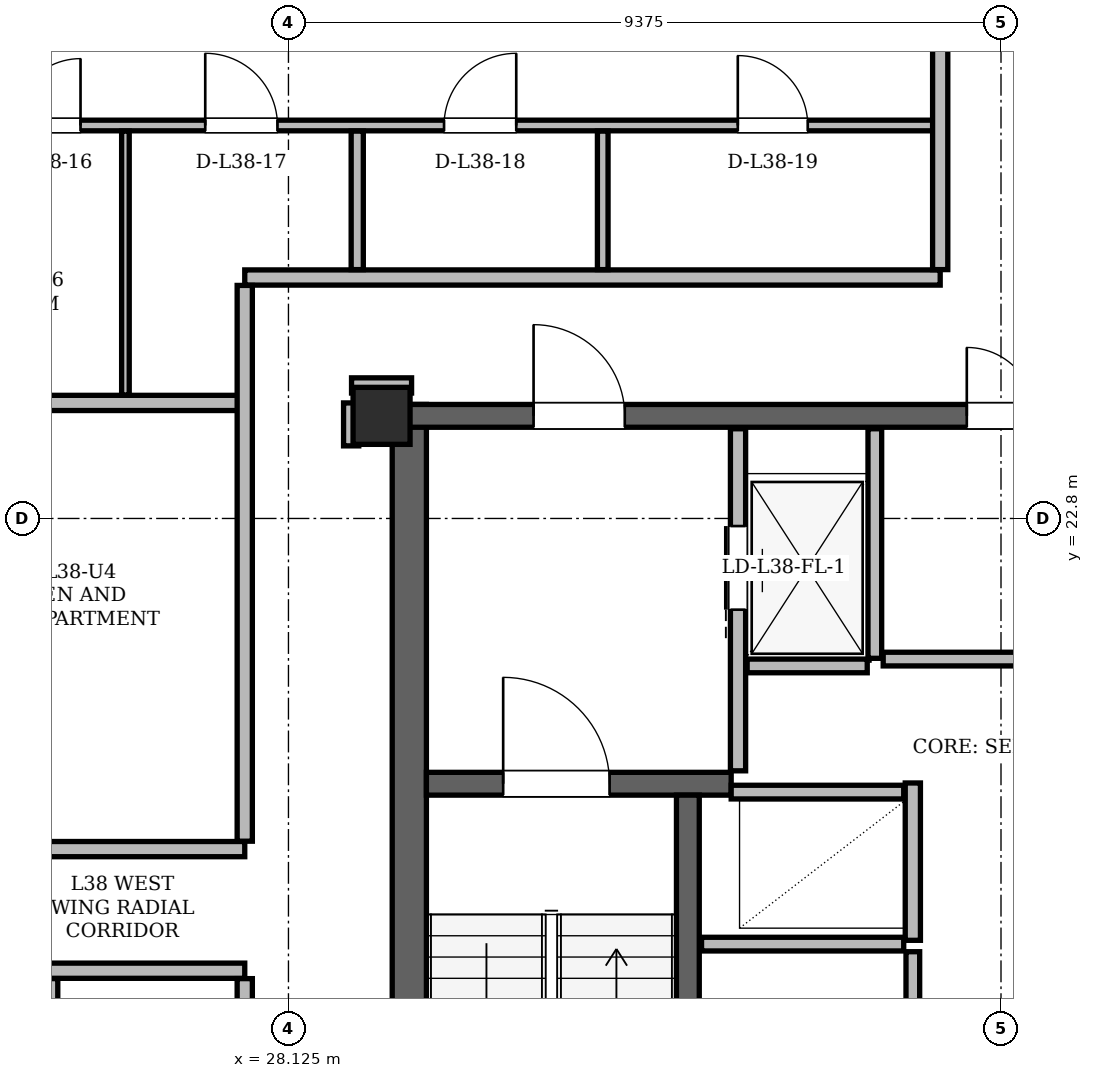
"""IFC4 building model, lengths in metres.
Left out: names, types, materials, properties, quantities, classifications, styles, units other than length and angle.
Written with IfcOpenShell. Run it as: python <this file> out.ifc"""

import sys

from ifc_helpers import new_model, si_unit, direction, frame, frame_2d, origin, origin_2d, place, context, subcontext, project, spatial, rectangle, hollow_rectangle, extrude, element, fill, save


model = new_model("IFC4")
c1 = context("Model", 3, precision=1e-05, world=origin(), true_north=direction((0.0, 1.0)))
c2 = subcontext(c1, "Body", "Model", "MODEL_VIEW")
j1 = project(units=[si_unit("LENGTHUNIT", "METRE"), si_unit("PLANEANGLEUNIT", "RADIAN")], contexts=[c1])
p1 = place(None, origin())
s1 = spatial("IfcSite", under=j1, at=p1, CompositionType="ELEMENT")
p2 = place(p1, origin())
s2 = spatial("IfcBuilding", under=s1, at=p2, CompositionType="ELEMENT")
p3 = place(p2, frame((0.0, 0.0, 145.8)))
s3 = spatial("IfcBuildingStorey", under=s2, at=p3, CompositionType="ELEMENT", Elevation=145.8)
p4 = place(p3, frame((29.35, 24.15, 0.0), z_axis=(0.0, 0.0, 1.0), x_axis=(1.0, 0.0, 0.0)))
e1 = element("IfcColumn", 1, at=p4, inside=s3, PredefinedType="COLUMN", context=c2, shape_type="SweptSolid", body=[
    extrude(hollow_rectangle(XDim=0.75, YDim=0.75, WallThickness=0.06, at=origin_2d()), origin(), (0.0, 0.0, 1.0), 3.6),
])
p5 = place(p3, frame((29.715, 11.0, 0.0), z_axis=(0.0, 0.0, 1.0), x_axis=(0.0, 1.0, 0.0)))
e2 = element("IfcWall", 2, at=p5, inside=s3, PredefinedType="SHEAR", context=c2, shape_type="SweptSolid", body=[
    extrude(rectangle(XDim=13.3, YDim=0.45, at=frame_2d((6.65, 0.0))), origin(), (0.0, 0.0, 1.0), 3.38),
])
p6 = place(p3, frame((29.65, 24.15, 0.0), z_axis=(0.0, 0.0, 1.0), x_axis=(1.0, 0.0, 0.0)))
e3 = element("IfcWall", 3, at=p6, inside=s3, PredefinedType="SHEAR", context=c2, shape_type="SweptSolid", body=[
    extrude(rectangle(XDim=15.7, YDim=0.3, at=frame_2d((7.85, 0.0))), origin(), (0.0, 0.0, 1.0), 3.38),
])
p7 = place(p6, frame((1.7, 0.0, 0.0)))
e4 = element("IfcOpeningElement", 4, at=p7, cuts=e3, PredefinedType="OPENING", context=c2, shape_type="SweptSolid", body=[
    extrude(rectangle(XDim=1.2, YDim=2.2, at=frame_2d((0.6, 1.1))), frame((0.0, 0.15, 0.0), z_axis=(0.0, -1.0, 0.0), x_axis=(1.0, 0.0, 0.0)), (0.0, 0.0, 1.0), 0.3),
])
p8 = place(p6, frame((12.8, 0.0, 0.0)))
e5 = element("IfcOpeningElement", 5, at=p8, cuts=e3, PredefinedType="OPENING", context=c2, shape_type="SweptSolid", body=[
    extrude(rectangle(XDim=1.2, YDim=2.2, at=frame_2d((0.6, 1.1))), frame((0.0, 0.15, 0.0), z_axis=(0.0, -1.0, 0.0), x_axis=(1.0, 0.0, 0.0)), (0.0, 0.0, 1.0), 0.3),
])
p9 = place(p6, frame((7.4, 0.0, 0.0)))
e6 = element("IfcOpeningElement", 6, at=p9, cuts=e3, PredefinedType="OPENING", context=c2, shape_type="SweptSolid", body=[
    extrude(rectangle(XDim=0.9, YDim=2.05, at=frame_2d((0.45, 1.025))), frame((0.0, 0.15, 0.0), z_axis=(0.0, -1.0, 0.0), x_axis=(1.0, 0.0, 0.0)), (0.0, 0.0, 1.0), 0.3),
])
p10 = place(p3, frame((29.94, 19.31, 0.0), z_axis=(0.0, 0.0, 1.0), x_axis=(1.0, 0.0, 0.0)))
e7 = element("IfcWall", 7, at=p10, inside=s3, PredefinedType="SHEAR", context=c2, shape_type="SweptSolid", body=[
    extrude(rectangle(XDim=4.01, YDim=0.3, at=frame_2d((2.005, 0.0))), origin(), (0.0, 0.0, 1.0), 3.38),
])
p11 = place(p10, frame((1.01, 0.0, 0.0)))
e8 = element("IfcOpeningElement", 8, at=p11, cuts=e7, PredefinedType="OPENING", context=c2, shape_type="SweptSolid", body=[
    extrude(rectangle(XDim=1.4, YDim=2.2, at=frame_2d((0.7, 1.1))), frame((0.0, 0.15, 0.0), z_axis=(0.0, -1.0, 0.0), x_axis=(1.0, 0.0, 0.0)), (0.0, 0.0, 1.0), 0.3),
])
p12 = place(p3, frame((33.38, 11.54, 0.0), z_axis=(0.0, 0.0, 1.0), x_axis=(0.0, 1.0, 0.0)))
e9 = element("IfcWall", 9, at=p12, inside=s3, PredefinedType="SHEAR", context=c2, shape_type="SweptSolid", body=[
    extrude(rectangle(XDim=7.62, YDim=0.3, at=frame_2d((3.81, 0.0))), origin(), (0.0, 0.0, 1.0), 3.38),
])
p13 = place(p3, frame((32.649, 43.341, 0.0), z_axis=(0.0, 0.0, 1.0), x_axis=(-0.500002412417, -0.86602401097, 0.0)))
e10 = element("IfcWall", 10, at=p13, inside=s3, PredefinedType="SOLIDWALL", context=c2, shape_type="SweptSolid", body=[
    extrude(rectangle(XDim=35.404, YDim=0.34, at=frame_2d((17.702, 0.0))), origin(), (0.0, 0.0, 1.0), 2.6),
])
p14 = place(p13, frame((6.579, 0.0, 0.0)))
e11 = element("IfcOpeningElement", 11, at=p14, cuts=e10, PredefinedType="OPENING", context=c2, shape_type="SweptSolid", body=[
    extrude(rectangle(XDim=1.5, YDim=2.2, at=frame_2d((0.75, 1.1))), frame((0.0, 0.17, 0.0), z_axis=(0.0, -1.0, 0.0), x_axis=(1.0, 0.0, 0.0)), (0.0, 0.0, 1.0), 0.34),
])
p15 = place(p13, frame((26.289, 0.0, 0.0)))
e12 = element("IfcOpeningElement", 12, at=p15, cuts=e10, PredefinedType="OPENING", context=c2, shape_type="SweptSolid", body=[
    extrude(rectangle(XDim=1.5, YDim=2.2, at=frame_2d((0.75, 1.1))), frame((0.0, 0.17, 0.0), z_axis=(0.0, -1.0, 0.0), x_axis=(1.0, 0.0, 0.0)), (0.0, 0.0, 1.0), 0.34),
])
p16 = place(p13, frame((22.194, 0.0, 0.85)))
e13 = element("IfcOpeningElement", 13, at=p16, cuts=e10, PredefinedType="OPENING", context=c2, shape_type="SweptSolid", body=[
    extrude(rectangle(XDim=1.2, YDim=1.48, at=frame_2d((0.6, 0.74))), frame((0.0, 0.17, 0.0), z_axis=(0.0, -1.0, 0.0), x_axis=(1.0, 0.0, 0.0)), (0.0, 0.0, 1.0), 0.34),
])
p17 = place(p13, frame((2.317, 0.0, 0.85)))
e14 = element("IfcOpeningElement", 14, at=p17, cuts=e10, PredefinedType="OPENING", context=c2, shape_type="SweptSolid", body=[
    extrude(rectangle(XDim=1.6, YDim=1.64, at=frame_2d((0.8, 0.82))), frame((0.0, 0.17, 0.0), z_axis=(0.0, -1.0, 0.0), x_axis=(1.0, 0.0, 0.0)), (0.0, 0.0, 1.0), 0.34),
])
p18 = place(p13, frame((12.951, 0.0, 0.85)))
e15 = element("IfcOpeningElement", 15, at=p18, cuts=e10, PredefinedType="OPENING", context=c2, shape_type="SweptSolid", body=[
    extrude(rectangle(XDim=3.0, YDim=1.64, at=frame_2d((1.5, 0.82))), frame((0.0, 0.17, 0.0), z_axis=(0.0, -1.0, 0.0), x_axis=(1.0, 0.0, 0.0)), (0.0, 0.0, 1.0), 0.34),
])
p19 = place(p13, frame((20.282, 0.0, 0.85)))
e16 = element("IfcOpeningElement", 16, at=p19, cuts=e10, PredefinedType="OPENING", context=c2, shape_type="SweptSolid", body=[
    extrude(rectangle(XDim=1.2, YDim=1.48, at=frame_2d((0.6, 0.74))), frame((0.0, 0.17, 0.0), z_axis=(0.0, -1.0, 0.0), x_axis=(1.0, 0.0, 0.0)), (0.0, 0.0, 1.0), 0.34),
])
p20 = place(p13, frame((33.524, 0.0, 0.85)))
e17 = element("IfcOpeningElement", 17, at=p20, cuts=e10, PredefinedType="OPENING", context=c2, shape_type="SweptSolid", body=[
    extrude(rectangle(XDim=1.2, YDim=1.48, at=frame_2d((0.6, 0.74))), frame((0.0, 0.17, 0.0), z_axis=(0.0, -1.0, 0.0), x_axis=(1.0, 0.0, 0.0)), (0.0, 0.0, 1.0), 0.34),
])
p21 = place(p3, frame((34.04, 19.48, 0.0), z_axis=(0.0, 0.0, 1.0), x_axis=(0.0, 1.0, 0.0)))
e18 = element("IfcWall", 18, at=p21, inside=s3, PredefinedType="PARTITIONING", context=c2, shape_type="SweptSolid", body=[
    extrude(rectangle(XDim=4.5, YDim=0.2, at=frame_2d((2.25, 0.0))), origin(), (0.0, 0.0, 1.0), 2.42),
])
p22 = place(p21, frame((2.12, 0.0, 0.0)))
e19 = element("IfcOpeningElement", 19, at=p22, cuts=e18, PredefinedType="OPENING", context=c2, shape_type="SweptSolid", body=[
    extrude(rectangle(XDim=1.1, YDim=2.2, at=frame_2d((0.55, 1.1))), frame((0.0, 0.1, 0.0), z_axis=(0.0, -1.0, 0.0), x_axis=(1.0, 0.0, 0.0)), (0.0, 0.0, 1.0), 0.2),
])
p23 = place(p3, frame((35.84, 20.96, 0.0), z_axis=(0.0, 0.0, 1.0), x_axis=(0.0, 1.0, 0.0)))
e20 = element("IfcWall", 20, at=p23, inside=s3, PredefinedType="PARTITIONING", context=c2, shape_type="SweptSolid", body=[
    extrude(rectangle(XDim=3.02, YDim=0.18, at=frame_2d((1.51, 0.0))), origin(), (0.0, 0.0, 1.0), 2.42),
])
p24 = place(p3, frame((34.16, 20.86, 0.0), z_axis=(0.0, 0.0, 1.0), x_axis=(1.0, 0.0, 0.0)))
e21 = element("IfcWall", 21, at=p24, inside=s3, PredefinedType="PARTITIONING", context=c2, shape_type="SweptSolid", body=[
    extrude(rectangle(XDim=1.58, YDim=0.18, at=frame_2d((0.79, 0.0))), origin(), (0.0, 0.0, 1.0), 3.38),
])
p25 = place(p3, frame((36.34, 17.25, 0.0), z_axis=(0.0, 0.0, 1.0), x_axis=(0.0, 1.0, 0.0)))
e22 = element("IfcWall", 22, at=p25, inside=s3, PredefinedType="PARTITIONING", context=c2, shape_type="SweptSolid", body=[
    extrude(rectangle(XDim=2.07, YDim=0.2, at=frame_2d((1.035, 0.0))), origin(), (0.0, 0.0, 1.0), 3.38),
])
p26 = place(p3, frame((33.95, 19.2, 0.0), z_axis=(0.0, 0.0, 1.0), x_axis=(1.0, 0.0, 0.0)))
e23 = element("IfcWall", 23, at=p26, inside=s3, PredefinedType="PARTITIONING", context=c2, shape_type="SweptSolid", body=[
    extrude(rectangle(XDim=2.27, YDim=0.18, at=frame_2d((1.135, 0.0))), origin(), (0.0, 0.0, 1.0), 3.38),
])
p27 = place(p3, frame((33.56, 17.2, 0.0), z_axis=(0.0, 0.0, 1.0), x_axis=(1.0, 0.0, 0.0)))
e24 = element("IfcWall", 24, at=p27, inside=s3, PredefinedType="PARTITIONING", context=c2, shape_type="SweptSolid", body=[
    extrude(rectangle(XDim=2.66, YDim=0.18, at=frame_2d((1.33, 0.0))), origin(), (0.0, 0.0, 1.0), 3.38),
])
p28 = place(p3, frame((36.34, 11.55, 0.0), z_axis=(0.0, 0.0, 1.0), x_axis=(0.0, 1.0, 0.0)))
e25 = element("IfcWall", 25, at=p28, inside=s3, PredefinedType="PARTITIONING", context=c2, shape_type="SweptSolid", body=[
    extrude(rectangle(XDim=5.55, YDim=0.18, at=frame_2d((2.775, 0.0))), origin(), (0.0, 0.0, 1.0), 3.38),
])
p29 = place(p28, frame((0.55, 0.0, 0.0)))
e26 = element("IfcOpeningElement", 26, at=p29, cuts=e25, PredefinedType="OPENING", context=c2, shape_type="SweptSolid", body=[
    extrude(rectangle(XDim=0.88, YDim=2.08, at=frame_2d((0.44, 1.04))), frame((0.0, 0.09, 0.0), z_axis=(0.0, -1.0, 0.0), x_axis=(1.0, 0.0, 0.0)), (0.0, 0.0, 1.0), 0.18),
])
p30 = place(p28, frame((3.25, 0.0, 0.0)))
e27 = element("IfcOpeningElement", 27, at=p30, cuts=e25, PredefinedType="OPENING", context=c2, shape_type="SweptSolid", body=[
    extrude(rectangle(XDim=0.88, YDim=2.08, at=frame_2d((0.44, 1.04))), frame((0.0, 0.09, 0.0), z_axis=(0.0, -1.0, 0.0), x_axis=(1.0, 0.0, 0.0)), (0.0, 0.0, 1.0), 0.18),
])
p31 = place(p3, frame((35.95, 20.95, 0.0), z_axis=(0.0, 0.0, 1.0), x_axis=(1.0, 0.0, 0.0)))
e28 = element("IfcWall", 28, at=p31, inside=s3, PredefinedType="PARTITIONING", context=c2, shape_type="SweptSolid", body=[
    extrude(rectangle(XDim=3.1, YDim=0.18, at=frame_2d((1.55, 0.0))), origin(), (0.0, 0.0, 1.0), 3.38),
])
p32 = place(p3, frame((17.556, 16.85, 0.0), z_axis=(0.0, 0.0, 1.0), x_axis=(1.0, 0.0, 0.0)))
e29 = element("IfcWall", 29, at=p32, inside=s3, PredefinedType="PARTITIONING", context=c2, shape_type="SweptSolid", body=[
    extrude(rectangle(XDim=9.994, YDim=0.2, at=frame_2d((4.997, 0.0))), origin(), (0.0, 0.0, 1.0), 3.38),
])
p33 = place(p3, frame((18.479, 18.45, 0.0), z_axis=(0.0, 0.0, 1.0), x_axis=(1.0, 0.0, 0.0)))
e30 = element("IfcWall", 30, at=p33, inside=s3, PredefinedType="PARTITIONING", context=c2, shape_type="SweptSolid", body=[
    extrude(rectangle(XDim=9.071, YDim=0.2, at=frame_2d((4.535, 0.0))), origin(), (0.0, 0.0, 1.0), 3.38),
])
p34 = place(p33, frame((4.941, 0.0, 0.0)))
e31 = element("IfcOpeningElement", 31, at=p34, cuts=e30, PredefinedType="OPENING", context=c2, shape_type="SweptSolid", body=[
    extrude(rectangle(XDim=1.0, YDim=2.18, at=frame_2d((0.5, 1.09))), frame((0.0, 0.1, 0.0), z_axis=(0.0, -1.0, 0.0), x_axis=(1.0, 0.0, 0.0)), (0.0, 0.0, 1.0), 0.2),
])
p35 = place(p3, frame((21.869, 24.32, 0.0), z_axis=(0.0, 0.0, 1.0), x_axis=(1.0, 0.0, 0.0)))
e32 = element("IfcWall", 32, at=p35, inside=s3, PredefinedType="PARTITIONING", context=c2, shape_type="SweptSolid", body=[
    extrude(rectangle(XDim=5.681, YDim=0.2, at=frame_2d((2.841, 0.0))), origin(), (0.0, 0.0, 1.0), 3.38),
])
p36 = place(p3, frame((28.955, 24.55, 0.0), z_axis=(0.0, 0.0, 1.0), x_axis=(1.0, 0.0, 0.0)))
e33 = element("IfcWall", 33, at=p36, inside=s3, PredefinedType="PARTITIONING", context=c2, shape_type="SweptSolid", body=[
    extrude(rectangle(XDim=0.79, YDim=0.2, at=frame_2d((0.395, 0.0))), origin(), (0.0, 0.0, 1.0), 2.842),
])
p37 = place(p3, frame((27.55, 25.97, 0.0), z_axis=(0.0, 0.0, 1.0), x_axis=(1.0, 0.0, 0.0)))
e34 = element("IfcWall", 34, at=p37, inside=s3, PredefinedType="PARTITIONING", context=c2, shape_type="SweptSolid", body=[
    extrude(rectangle(XDim=9.15, YDim=0.2, at=frame_2d((4.575, 0.0))), origin(), (0.0, 0.0, 1.0), 2.842),
])
p38 = place(p3, frame((23.976, 27.97, 0.0), z_axis=(0.0, 0.0, 1.0), x_axis=(1.0, 0.0, 0.0)))
e35 = element("IfcWall", 35, at=p38, inside=s3, PredefinedType="PARTITIONING", context=c2, shape_type="SweptSolid", body=[
    extrude(rectangle(XDim=12.774, YDim=0.14, at=frame_2d((6.387, 0.0))), origin(), (0.0, 0.0, 1.0), 2.842),
])
p39 = place(p38, frame((0.533, 0.0, 0.0)))
e36 = element("IfcOpeningElement", 36, at=p39, cuts=e35, PredefinedType="OPENING", context=c2, shape_type="SweptSolid", body=[
    extrude(rectangle(XDim=0.88, YDim=2.08, at=frame_2d((0.44, 1.04))), frame((0.0, 0.07, 0.0), z_axis=(0.0, -1.0, 0.0), x_axis=(1.0, 0.0, 0.0)), (0.0, 0.0, 1.0), 0.14),
])
p40 = place(p38, frame((3.054, 0.0, 0.0)))
e37 = element("IfcOpeningElement", 37, at=p40, cuts=e35, PredefinedType="OPENING", context=c2, shape_type="SweptSolid", body=[
    extrude(rectangle(XDim=0.95, YDim=2.1, at=frame_2d((0.475, 1.05))), frame((0.0, 0.07, 0.0), z_axis=(0.0, -1.0, 0.0), x_axis=(1.0, 0.0, 0.0)), (0.0, 0.0, 1.0), 0.14),
])
p41 = place(p38, frame((6.196, 0.0, 0.0)))
e38 = element("IfcOpeningElement", 38, at=p41, cuts=e35, PredefinedType="OPENING", context=c2, shape_type="SweptSolid", body=[
    extrude(rectangle(XDim=0.95, YDim=2.1, at=frame_2d((0.475, 1.05))), frame((0.0, 0.07, 0.0), z_axis=(0.0, -1.0, 0.0), x_axis=(1.0, 0.0, 0.0)), (0.0, 0.0, 1.0), 0.14),
])
p42 = place(p38, frame((10.061, 0.0, 0.0)))
e39 = element("IfcOpeningElement", 39, at=p42, cuts=e35, PredefinedType="OPENING", context=c2, shape_type="SweptSolid", body=[
    extrude(rectangle(XDim=0.92, YDim=2.12, at=frame_2d((0.46, 1.06))), frame((0.0, 0.07, 0.0), z_axis=(0.0, -1.0, 0.0), x_axis=(1.0, 0.0, 0.0)), (0.0, 0.0, 1.0), 0.14),
])
p43 = place(p3, frame((25.03, 14.334, 0.0), z_axis=(0.0, 0.0, 1.0), x_axis=(0.0, 1.0, 0.0)))
e40 = element("IfcWall", 40, at=p43, inside=s3, PredefinedType="PARTITIONING", context=c2, shape_type="SweptSolid", body=[
    extrude(rectangle(XDim=2.412, YDim=0.12, at=frame_2d((1.206, 0.0))), origin(), (0.0, 0.0, 1.0), 3.38),
])
p44 = place(p3, frame((25.98, 24.424, 0.0), z_axis=(0.0, 0.0, 1.0), x_axis=(0.0, 1.0, 0.0)))
e41 = element("IfcWall", 41, at=p44, inside=s3, PredefinedType="PARTITIONING", context=c2, shape_type="SweptSolid", body=[
    extrude(rectangle(XDim=3.472, YDim=0.1, at=frame_2d((1.736, 0.0))), origin(), (0.0, 0.0, 1.0), 3.38),
])
p45 = place(p3, frame((27.55, 11.054, 0.0), z_axis=(0.0, 0.0, 1.0), x_axis=(0.0, 1.0, 0.0)))
e42 = element("IfcWall", 42, at=p45, inside=s3, PredefinedType="PARTITIONING", context=c2, shape_type="SweptSolid", body=[
    extrude(rectangle(XDim=5.692, YDim=0.2, at=frame_2d((2.846, 0.0))), origin(), (0.0, 0.0, 1.0), 2.842),
])
p46 = place(p3, frame((27.55, 18.554, 0.0), z_axis=(0.0, 0.0, 1.0), x_axis=(0.0, 1.0, 0.0)))
e43 = element("IfcWall", 43, at=p46, inside=s3, PredefinedType="PARTITIONING", context=c2, shape_type="SweptSolid", body=[
    extrude(rectangle(XDim=7.312, YDim=0.2, at=frame_2d((3.656, 0.0))), origin(), (0.0, 0.0, 1.0), 3.38),
])
p47 = place(p3, frame((28.95, 23.755, 0.0), z_axis=(0.0, 0.0, 1.0), x_axis=(0.0, 1.0, 0.0)))
e44 = element("IfcWall", 44, at=p47, inside=s3, PredefinedType="PARTITIONING", context=c2, shape_type="SweptSolid", body=[
    extrude(rectangle(XDim=0.565, YDim=0.2, at=frame_2d((0.283, 0.0))), origin(), (0.0, 0.0, 1.0), 3.38),
])
p48 = place(p3, frame((29.03, 26.074, 0.0), z_axis=(0.0, 0.0, 1.0), x_axis=(0.0, 1.0, 0.0)))
e45 = element("IfcWall", 45, at=p48, inside=s3, PredefinedType="PARTITIONING", context=c2, shape_type="SweptSolid", body=[
    extrude(rectangle(XDim=1.822, YDim=0.16, at=frame_2d((0.911, 0.0))), origin(), (0.0, 0.0, 1.0), 3.38),
])
p49 = place(p3, frame((32.26, 26.074, 0.0), z_axis=(0.0, 0.0, 1.0), x_axis=(0.0, 1.0, 0.0)))
e46 = element("IfcWall", 46, at=p49, inside=s3, PredefinedType="PARTITIONING", context=c2, shape_type="SweptSolid", body=[
    extrude(rectangle(XDim=1.822, YDim=0.14, at=frame_2d((0.911, 0.0))), origin(), (0.0, 0.0, 1.0), 3.38),
])
p50 = place(p3, frame((36.7, 26.074, 0.0), z_axis=(0.0, 0.0, 1.0), x_axis=(0.0, 1.0, 0.0)))
e47 = element("IfcWall", 47, at=p50, inside=s3, PredefinedType="PARTITIONING", context=c2, shape_type="SweptSolid", body=[
    extrude(rectangle(XDim=17.093, YDim=0.2, at=frame_2d((8.546, 0.0))), origin(), (0.0, 0.0, 1.0), 3.38),
])
p51 = place(p50, frame((7.042, 0.0, 0.0)))
e48 = element("IfcOpeningElement", 48, at=p51, cuts=e47, PredefinedType="OPENING", context=c2, shape_type="SweptSolid", body=[
    extrude(rectangle(XDim=1.0, YDim=2.18, at=frame_2d((0.5, 1.09))), frame((0.0, 0.1, 0.0), z_axis=(0.0, -1.0, 0.0), x_axis=(1.0, 0.0, 0.0)), (0.0, 0.0, 1.0), 0.2),
])
p52 = place(p22, origin())
e49 = element("IfcDoor", 49, at=p52, inside=s3, OperationType="SLIDING_TO_LEFT", PredefinedType="DOOR", context=c2, shape_type="SweptSolid", body=[
    extrude(rectangle(XDim=1.1, YDim=2.2, at=frame_2d((0.55, 1.1))), frame((0.0, 0.025, 0.0), z_axis=(0.0, -1.0, 0.0), x_axis=(1.0, 0.0, 0.0)), (0.0, 0.0, 1.0), 0.05),
])
fill(e19, e49)
p53 = place(p11, origin())
e50 = element("IfcDoor", 50, at=p53, inside=s3, OperationType="SINGLE_SWING_LEFT", PredefinedType="DOOR", context=c2, shape_type="SweptSolid", body=[
    extrude(rectangle(XDim=1.4, YDim=2.2, at=frame_2d((0.7, 1.1))), frame((0.0, 0.025, 0.0), z_axis=(0.0, -1.0, 0.0), x_axis=(1.0, 0.0, 0.0)), (0.0, 0.0, 1.0), 0.05),
])
fill(e8, e50)
p54 = place(p7, origin())
e51 = element("IfcDoor", 51, at=p54, inside=s3, OperationType="SINGLE_SWING_LEFT", PredefinedType="DOOR", context=c2, shape_type="SweptSolid", body=[
    extrude(rectangle(XDim=1.2, YDim=2.2, at=frame_2d((0.6, 1.1))), frame((0.0, 0.025, 0.0), z_axis=(0.0, -1.0, 0.0), x_axis=(1.0, 0.0, 0.0)), (0.0, 0.0, 1.0), 0.05),
])
fill(e4, e51)
p55 = place(p9, origin())
e52 = element("IfcDoor", 52, at=p55, inside=s3, OperationType="SINGLE_SWING_LEFT", PredefinedType="DOOR", context=c2, shape_type="SweptSolid", body=[
    extrude(rectangle(XDim=0.9, YDim=2.05, at=frame_2d((0.45, 1.025))), frame((0.0, 0.025, 0.0), z_axis=(0.0, -1.0, 0.0), x_axis=(1.0, 0.0, 0.0)), (0.0, 0.0, 1.0), 0.05),
])
fill(e6, e52)
p56 = place(p39, origin())
e53 = element("IfcDoor", 53, at=p56, inside=s3, OperationType="SINGLE_SWING_RIGHT", PredefinedType="DOOR", context=c2, shape_type="SweptSolid", body=[
    extrude(rectangle(XDim=0.88, YDim=2.08, at=frame_2d((0.44, 1.04))), frame((0.0, 0.025, 0.0), z_axis=(0.0, -1.0, 0.0), x_axis=(1.0, 0.0, 0.0)), (0.0, 0.0, 1.0), 0.05),
])
fill(e36, e53)
p57 = place(p40, origin())
e54 = element("IfcDoor", 54, at=p57, inside=s3, OperationType="SINGLE_SWING_LEFT", PredefinedType="DOOR", context=c2, shape_type="SweptSolid", body=[
    extrude(rectangle(XDim=0.95, YDim=2.1, at=frame_2d((0.475, 1.05))), frame((0.0, 0.025, 0.0), z_axis=(0.0, -1.0, 0.0), x_axis=(1.0, 0.0, 0.0)), (0.0, 0.0, 1.0), 0.05),
])
fill(e37, e54)
p58 = place(p41, origin())
e55 = element("IfcDoor", 55, at=p58, inside=s3, OperationType="SINGLE_SWING_RIGHT", PredefinedType="DOOR", context=c2, shape_type="SweptSolid", body=[
    extrude(rectangle(XDim=0.95, YDim=2.1, at=frame_2d((0.475, 1.05))), frame((0.0, 0.025, 0.0), z_axis=(0.0, -1.0, 0.0), x_axis=(1.0, 0.0, 0.0)), (0.0, 0.0, 1.0), 0.05),
])
fill(e38, e55)
p59 = place(p42, origin())
e56 = element("IfcDoor", 56, at=p59, inside=s3, OperationType="SINGLE_SWING_LEFT", PredefinedType="DOOR", context=c2, shape_type="SweptSolid", body=[
    extrude(rectangle(XDim=0.92, YDim=2.12, at=frame_2d((0.46, 1.06))), frame((0.0, 0.025, 0.0), z_axis=(0.0, -1.0, 0.0), x_axis=(1.0, 0.0, 0.0)), (0.0, 0.0, 1.0), 0.05),
])
fill(e39, e56)
save(model, sys.argv[1])
